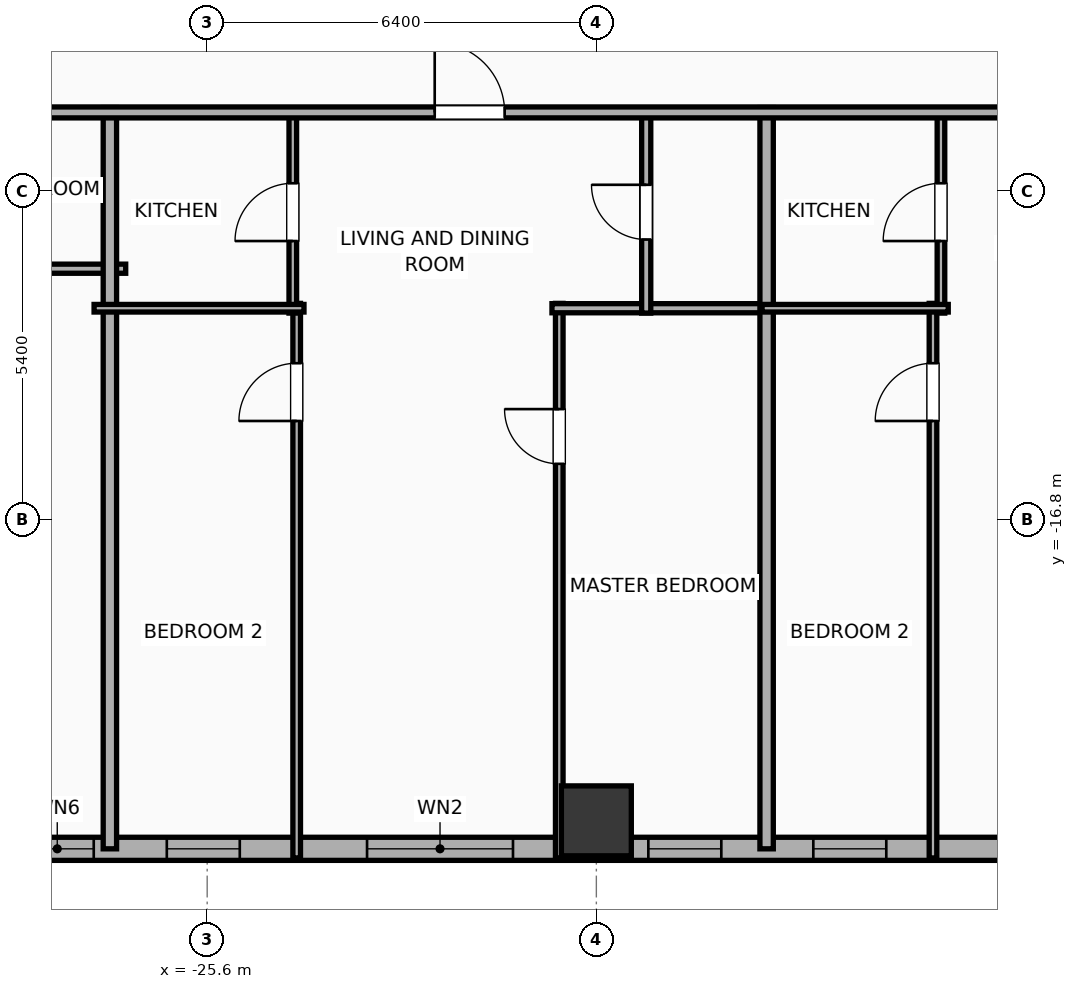
"""IFC4 building model, lengths in metres.
Left out: names, types, materials, properties, quantities, classifications, styles, units other than length and angle.
Written with IfcOpenShell. Run it as: python <this file> out.ifc"""

import sys

from ifc_helpers import new_model, si_unit, direction, frame, frame_2d, origin, origin_2d, place, context, subcontext, project, spatial, rectangle, hollow_rectangle, extrude, element, fill, save


model = new_model("IFC4")
c1 = context("Model", 3, precision=1e-05, world=origin(), true_north=direction((0.0, 1.0)))
c2 = subcontext(c1, "Body", "Model", "MODEL_VIEW")
j1 = project(units=[si_unit("LENGTHUNIT", "METRE"), si_unit("PLANEANGLEUNIT", "RADIAN")], contexts=[c1])
p1 = place(None, origin())
s1 = spatial("IfcSite", under=j1, at=p1, CompositionType="ELEMENT")
p2 = place(p1, origin())
s2 = spatial("IfcBuilding", under=s1, at=p2, CompositionType="ELEMENT")
p3 = place(p2, frame((0.0, 0.0, 45.5)))
s3 = spatial("IfcBuildingStorey", under=s2, at=p3, CompositionType="ELEMENT", Elevation=45.5)
p4 = place(p3, frame((-19.2, -21.75, 0.0), z_axis=(0.0, 0.0, 1.0), x_axis=(1.0, 0.0, 0.0)))
e1 = element("IfcColumn", 1, at=p4, inside=s3, PredefinedType="COLUMN", context=c2, shape_type="SweptSolid", body=[
    extrude(hollow_rectangle(XDim=1.15, YDim=1.15, WallThickness=0.04, at=origin_2d()), origin(), (0.0, 0.0, 1.0), 3.9),
])
p5 = place(p3, frame((22.381, -22.21, 0.0), z_axis=(0.0, 0.0, 1.0), x_axis=(-1.0, 0.0, 0.0)))
e2 = element("IfcWall", 2, at=p5, inside=s3, PredefinedType="ELEMENTEDWALL", context=c2, shape_type="SweptSolid", body=[
    extrude(rectangle(XDim=51.963, YDim=0.38, at=frame_2d((25.981, 0.0))), origin(), (0.0, 0.0, 1.0), 3.65),
])
p6 = place(p5, frame((42.952, 0.0, 0.75)))
e3 = element("IfcOpeningElement", 3, at=p6, cuts=e2, PredefinedType="OPENING", context=c2, shape_type="SweptSolid", body=[
    extrude(rectangle(XDim=2.4, YDim=2.1, at=frame_2d((1.2, 1.05))), frame((0.0, 0.2, 0.0), z_axis=(0.0, -1.0, 0.0), x_axis=(1.0, 0.0, 0.0)), (0.0, 0.0, 1.0), 0.4),
])
p7 = place(p5, frame((49.847, 0.0, 0.75)))
e4 = element("IfcOpeningElement", 4, at=p7, cuts=e2, PredefinedType="OPENING", context=c2, shape_type="SweptSolid", body=[
    extrude(rectangle(XDim=1.2, YDim=2.05, at=frame_2d((0.6, 1.025))), frame((0.0, 0.2, 0.0), z_axis=(0.0, -1.0, 0.0), x_axis=(1.0, 0.0, 0.0)), (0.0, 0.0, 1.0), 0.4),
])
p8 = place(p5, frame((47.445, 0.0, 0.75)))
e5 = element("IfcOpeningElement", 5, at=p8, cuts=e2, PredefinedType="OPENING", context=c2, shape_type="SweptSolid", body=[
    extrude(rectangle(XDim=1.2, YDim=2.05, at=frame_2d((0.6, 1.025))), frame((0.0, 0.2, 0.0), z_axis=(0.0, -1.0, 0.0), x_axis=(1.0, 0.0, 0.0)), (0.0, 0.0, 1.0), 0.4),
])
p9 = place(p5, frame((39.526, 0.0, 0.75)))
e6 = element("IfcOpeningElement", 6, at=p9, cuts=e2, PredefinedType="OPENING", context=c2, shape_type="SweptSolid", body=[
    extrude(rectangle(XDim=1.2, YDim=2.05, at=frame_2d((0.6, 1.025))), frame((0.0, 0.2, 0.0), z_axis=(0.0, -1.0, 0.0), x_axis=(1.0, 0.0, 0.0)), (0.0, 0.0, 1.0), 0.4),
])
p10 = place(p5, frame((33.018, 0.0, 0.75)))
e7 = element("IfcOpeningElement", 7, at=p10, cuts=e2, PredefinedType="OPENING", context=c2, shape_type="SweptSolid", body=[
    extrude(rectangle(XDim=1.2, YDim=2.05, at=frame_2d((0.6, 1.025))), frame((0.0, 0.2, 0.0), z_axis=(0.0, -1.0, 0.0), x_axis=(1.0, 0.0, 0.0)), (0.0, 0.0, 1.0), 0.4),
])
p11 = place(p5, frame((36.813, 0.0, 0.75)))
e8 = element("IfcOpeningElement", 8, at=p11, cuts=e2, PredefinedType="OPENING", context=c2, shape_type="SweptSolid", body=[
    extrude(rectangle(XDim=1.2, YDim=2.05, at=frame_2d((0.6, 1.025))), frame((0.0, 0.2, 0.0), z_axis=(0.0, -1.0, 0.0), x_axis=(1.0, 0.0, 0.0)), (0.0, 0.0, 1.0), 0.4),
])
p12 = place(p5, frame((28.886, 0.0, 0.75)))
e9 = element("IfcOpeningElement", 9, at=p12, cuts=e2, PredefinedType="OPENING", context=c2, shape_type="SweptSolid", body=[
    extrude(rectangle(XDim=1.2, YDim=2.05, at=frame_2d((0.6, 1.025))), frame((0.0, 0.2, 0.0), z_axis=(0.0, -1.0, 0.0), x_axis=(1.0, 0.0, 0.0)), (0.0, 0.0, 1.0), 0.4),
])
p13 = place(p5, frame((23.306, 0.0, 0.75)))
e10 = element("IfcOpeningElement", 10, at=p13, cuts=e2, PredefinedType="OPENING", context=c2, shape_type="SweptSolid", body=[
    extrude(rectangle(XDim=1.2, YDim=2.05, at=frame_2d((0.6, 1.025))), frame((0.0, 0.2, 0.0), z_axis=(0.0, -1.0, 0.0), x_axis=(1.0, 0.0, 0.0)), (0.0, 0.0, 1.0), 0.4),
])
p14 = place(p5, frame((26.056, 0.0, 0.75)))
e11 = element("IfcOpeningElement", 11, at=p14, cuts=e2, PredefinedType="OPENING", context=c2, shape_type="SweptSolid", body=[
    extrude(rectangle(XDim=1.2, YDim=2.05, at=frame_2d((0.6, 1.025))), frame((0.0, 0.2, 0.0), z_axis=(0.0, -1.0, 0.0), x_axis=(1.0, 0.0, 0.0)), (0.0, 0.0, 1.0), 0.4),
])
p15 = place(p5, frame((18.811, 0.0, 0.75)))
e12 = element("IfcOpeningElement", 12, at=p15, cuts=e2, PredefinedType="OPENING", context=c2, shape_type="SweptSolid", body=[
    extrude(rectangle(XDim=1.2, YDim=2.05, at=frame_2d((0.6, 1.025))), frame((0.0, 0.2, 0.0), z_axis=(0.0, -1.0, 0.0), x_axis=(1.0, 0.0, 0.0)), (0.0, 0.0, 1.0), 0.4),
])
p16 = place(p5, frame((14.602, 0.0, 0.75)))
e13 = element("IfcOpeningElement", 13, at=p16, cuts=e2, PredefinedType="OPENING", context=c2, shape_type="SweptSolid", body=[
    extrude(rectangle(XDim=1.2, YDim=2.05, at=frame_2d((0.6, 1.025))), frame((0.0, 0.2, 0.0), z_axis=(0.0, -1.0, 0.0), x_axis=(1.0, 0.0, 0.0)), (0.0, 0.0, 1.0), 0.4),
])
p17 = place(p5, frame((11.852, 0.0, 0.75)))
e14 = element("IfcOpeningElement", 14, at=p17, cuts=e2, PredefinedType="OPENING", context=c2, shape_type="SweptSolid", body=[
    extrude(rectangle(XDim=1.2, YDim=2.05, at=frame_2d((0.6, 1.025))), frame((0.0, 0.2, 0.0), z_axis=(0.0, -1.0, 0.0), x_axis=(1.0, 0.0, 0.0)), (0.0, 0.0, 1.0), 0.4),
])
p18 = place(p5, frame((8.316, 0.0, 0.75)))
e15 = element("IfcOpeningElement", 15, at=p18, cuts=e2, PredefinedType="OPENING", context=c2, shape_type="SweptSolid", body=[
    extrude(rectangle(XDim=1.2, YDim=2.05, at=frame_2d((0.6, 1.025))), frame((0.0, 0.2, 0.0), z_axis=(0.0, -1.0, 0.0), x_axis=(1.0, 0.0, 0.0)), (0.0, 0.0, 1.0), 0.4),
])
p19 = place(p5, frame((6.286, 0.0, 0.75)))
e16 = element("IfcOpeningElement", 16, at=p19, cuts=e2, PredefinedType="OPENING", context=c2, shape_type="SweptSolid", body=[
    extrude(rectangle(XDim=1.2, YDim=2.05, at=frame_2d((0.6, 1.025))), frame((0.0, 0.2, 0.0), z_axis=(0.0, -1.0, 0.0), x_axis=(1.0, 0.0, 0.0)), (0.0, 0.0, 1.0), 0.4),
])
p20 = place(p5, frame((3.737, 0.0, 0.75)))
e17 = element("IfcOpeningElement", 17, at=p20, cuts=e2, PredefinedType="OPENING", context=c2, shape_type="SweptSolid", body=[
    extrude(rectangle(XDim=1.2, YDim=2.05, at=frame_2d((0.6, 1.025))), frame((0.0, 0.2, 0.0), z_axis=(0.0, -1.0, 0.0), x_axis=(1.0, 0.0, 0.0)), (0.0, 0.0, 1.0), 0.4),
])
p21 = place(p5, frame((1.291, 0.0, 0.75)))
e18 = element("IfcOpeningElement", 18, at=p21, cuts=e2, PredefinedType="OPENING", context=c2, shape_type="SweptSolid", body=[
    extrude(rectangle(XDim=1.2, YDim=2.05, at=frame_2d((0.6, 1.025))), frame((0.0, 0.2, 0.0), z_axis=(0.0, -1.0, 0.0), x_axis=(1.0, 0.0, 0.0)), (0.0, 0.0, 1.0), 0.4),
])
p22 = place(p3, frame((-29.414, -12.67, 0.0), z_axis=(0.0, 0.0, 1.0), x_axis=(1.0, 0.0, 0.0)))
e19 = element("IfcWall", 19, at=p22, inside=s3, PredefinedType="PLUMBINGWALL", context=c2, shape_type="SweptSolid", body=[
    extrude(rectangle(XDim=2.474, YDim=0.15, at=frame_2d((1.237, 0.0))), origin(), (0.0, 0.0, 1.0), 3.65),
])
p23 = place(p3, frame((-27.2, -22.21, 0.0), z_axis=(0.0, 0.0, 1.0), x_axis=(0.0, 1.0, 0.0)))
e20 = element("IfcWall", 20, at=p23, inside=s3, PredefinedType="PARTITIONING", context=c2, shape_type="SweptSolid", body=[
    extrude(rectangle(XDim=12.19, YDim=0.22, at=frame_2d((6.095, 0.0))), origin(), (0.0, 0.0, 1.0), 3.65),
])
p24 = place(p3, frame((-24.128, -22.36, 0.0), z_axis=(0.0, 0.0, 1.0), x_axis=(0.0, 1.0, 0.0)))
e21 = element("IfcWall", 21, at=p24, inside=s3, PredefinedType="PARTITIONING", context=c2, shape_type="SweptSolid", body=[
    extrude(rectangle(XDim=9.12, YDim=0.125, at=frame_2d((4.56, 0.0))), origin(), (0.0, 0.0, 1.0), 3.65),
])
p25 = place(p24, frame((7.186, 0.0, 0.0)))
e22 = element("IfcOpeningElement", 22, at=p25, cuts=e21, PredefinedType="OPENING", context=c2, shape_type="SweptSolid", body=[
    extrude(rectangle(XDim=0.95, YDim=2.05, at=frame_2d((0.475, 1.025))), frame((0.0, 0.073, 0.0), z_axis=(0.0, -1.0, 0.0), x_axis=(1.0, 0.0, 0.0)), (0.0, 0.0, 1.0), 0.145),
])
p26 = place(p3, frame((-19.81, -22.36, 0.0), z_axis=(0.0, 0.0, 1.0), x_axis=(0.0, 1.0, 0.0)))
e23 = element("IfcWall", 23, at=p26, inside=s3, PredefinedType="PARTITIONING", context=c2, shape_type="SweptSolid", body=[
    extrude(rectangle(XDim=9.12, YDim=0.125, at=frame_2d((4.56, 0.0))), origin(), (0.0, 0.0, 1.0), 3.65),
])
p27 = place(p26, frame((6.481, 0.0, 0.0)))
e24 = element("IfcOpeningElement", 24, at=p27, cuts=e23, PredefinedType="OPENING", context=c2, shape_type="SweptSolid", body=[
    extrude(rectangle(XDim=0.9, YDim=2.05, at=frame_2d((0.45, 1.025))), frame((0.0, 0.073, 0.0), z_axis=(0.0, -1.0, 0.0), x_axis=(1.0, 0.0, 0.0)), (0.0, 0.0, 1.0), 0.145),
])
p28 = place(p3, frame((-19.93, -13.32, 0.0), z_axis=(0.0, 0.0, 1.0), x_axis=(1.0, 0.0, 0.0)))
e25 = element("IfcWall", 25, at=p28, inside=s3, PredefinedType="PLUMBINGWALL", context=c2, shape_type="SweptSolid", body=[
    extrude(rectangle(XDim=3.605, YDim=0.15, at=frame_2d((1.802, 0.0))), origin(), (0.0, 0.0, 1.0), 3.65),
])
p29 = place(p3, frame((-24.192, -13.4, 0.0), z_axis=(0.0, 0.0, 1.0), x_axis=(0.0, 1.0, 0.0)))
e26 = element("IfcWall", 26, at=p29, inside=s3, PredefinedType="PARTITIONING", context=c2, shape_type="SweptSolid", body=[
    extrude(rectangle(XDim=3.32, YDim=0.125, at=frame_2d((1.66, 0.0))), origin(), (0.0, 0.0, 1.0), 3.65),
])
p30 = place(p29, frame((1.185, 0.0, 0.0)))
e27 = element("IfcOpeningElement", 27, at=p30, cuts=e26, PredefinedType="OPENING", context=c2, shape_type="SweptSolid", body=[
    extrude(rectangle(XDim=0.95, YDim=2.05, at=frame_2d((0.475, 1.025))), frame((0.0, 0.073, 0.0), z_axis=(0.0, -1.0, 0.0), x_axis=(1.0, 0.0, 0.0)), (0.0, 0.0, 1.0), 0.145),
])
p31 = place(p3, frame((-27.46, -13.32, 0.0), z_axis=(0.0, 0.0, 1.0), x_axis=(1.0, 0.0, 0.0)))
e28 = element("IfcWall", 28, at=p31, inside=s3, PredefinedType="PARTITIONING", context=c2, shape_type="SweptSolid", body=[
    extrude(rectangle(XDim=3.452, YDim=0.125, at=frame_2d((1.726, 0.0))), origin(), (0.0, 0.0, 1.0), 3.65),
])
p32 = place(p3, frame((-18.38, -13.4, 0.0), z_axis=(0.0, 0.0, 1.0), x_axis=(0.0, 1.0, 0.0)))
e29 = element("IfcWall", 29, at=p32, inside=s3, PredefinedType="PLUMBINGWALL", context=c2, shape_type="SweptSolid", body=[
    extrude(rectangle(XDim=3.32, YDim=0.15, at=frame_2d((1.66, 0.0))), origin(), (0.0, 0.0, 1.0), 3.65),
])
p33 = place(p32, frame((1.21, 0.0, 0.0)))
e30 = element("IfcOpeningElement", 30, at=p33, cuts=e29, PredefinedType="OPENING", context=c2, shape_type="SweptSolid", body=[
    extrude(rectangle(XDim=0.9, YDim=2.05, at=frame_2d((0.45, 1.025))), frame((0.0, 0.085, 0.0), z_axis=(0.0, -1.0, 0.0), x_axis=(1.0, 0.0, 0.0)), (0.0, 0.0, 1.0), 0.17),
])
p34 = place(p3, frame((-16.4, -22.21, 0.0), z_axis=(0.0, 0.0, 1.0), x_axis=(0.0, 1.0, 0.0)))
e31 = element("IfcWall", 31, at=p34, inside=s3, PredefinedType="PARTITIONING", context=c2, shape_type="SweptSolid", body=[
    extrude(rectangle(XDim=12.19, YDim=0.22, at=frame_2d((6.095, 0.0))), origin(), (0.0, 0.0, 1.0), 3.65),
])
p35 = place(p3, frame((-13.664, -22.36, 0.0), z_axis=(0.0, 0.0, 1.0), x_axis=(0.0, 1.0, 0.0)))
e32 = element("IfcWall", 32, at=p35, inside=s3, PredefinedType="PARTITIONING", context=c2, shape_type="SweptSolid", body=[
    extrude(rectangle(XDim=9.12, YDim=0.125, at=frame_2d((4.56, 0.0))), origin(), (0.0, 0.0, 1.0), 3.65),
])
p36 = place(p35, frame((7.186, 0.0, 0.0)))
e33 = element("IfcOpeningElement", 33, at=p36, cuts=e32, PredefinedType="OPENING", context=c2, shape_type="SweptSolid", body=[
    extrude(rectangle(XDim=0.95, YDim=2.05, at=frame_2d((0.475, 1.025))), frame((0.0, 0.073, 0.0), z_axis=(0.0, -1.0, 0.0), x_axis=(1.0, 0.0, 0.0)), (0.0, 0.0, 1.0), 0.145),
])
p37 = place(p3, frame((-13.533, -13.4, 0.0), z_axis=(0.0, 0.0, 1.0), x_axis=(0.0, 1.0, 0.0)))
e34 = element("IfcWall", 34, at=p37, inside=s3, PredefinedType="PARTITIONING", context=c2, shape_type="SweptSolid", body=[
    extrude(rectangle(XDim=3.32, YDim=0.125, at=frame_2d((1.66, 0.0))), origin(), (0.0, 0.0, 1.0), 3.65),
])
p38 = place(p37, frame((1.185, 0.0, 0.0)))
e35 = element("IfcOpeningElement", 35, at=p38, cuts=e34, PredefinedType="OPENING", context=c2, shape_type="SweptSolid", body=[
    extrude(rectangle(XDim=0.95, YDim=2.05, at=frame_2d((0.475, 1.025))), frame((0.0, 0.073, 0.0), z_axis=(0.0, -1.0, 0.0), x_axis=(1.0, 0.0, 0.0)), (0.0, 0.0, 1.0), 0.145),
])
p39 = place(p3, frame((-16.475, -13.32, 0.0), z_axis=(0.0, 0.0, 1.0), x_axis=(1.0, 0.0, 0.0)))
e36 = element("IfcWall", 36, at=p39, inside=s3, PredefinedType="PARTITIONING", context=c2, shape_type="SweptSolid", body=[
    extrude(rectangle(XDim=3.062, YDim=0.125, at=frame_2d((1.531, 0.0))), origin(), (0.0, 0.0, 1.0), 3.65),
])
p40 = place(p3, frame((-33.41, -10.1, 0.0), z_axis=(0.0, 0.0, 1.0), x_axis=(1.0, 0.0, 0.0)))
e37 = element("IfcWall", 37, at=p40, inside=s3, PredefinedType="PARTITIONING", context=c2, shape_type="SweptSolid", body=[
    extrude(rectangle(XDim=59.62, YDim=0.18, at=frame_2d((29.81, 0.0))), origin(), (0.0, 0.0, 1.0), 3.65),
])
p41 = place(p40, frame((2.746, 0.0, 0.0)))
e38 = element("IfcOpeningElement", 38, at=p41, cuts=e37, PredefinedType="OPENING", context=c2, shape_type="SweptSolid", body=[
    extrude(rectangle(XDim=0.9, YDim=2.05, at=frame_2d((0.45, 1.025))), frame((0.0, 0.1, 0.0), z_axis=(0.0, -1.0, 0.0), x_axis=(1.0, 0.0, 0.0)), (0.0, 0.0, 1.0), 0.2),
])
p42 = place(p40, frame((11.552, 0.0, 0.0)))
e39 = element("IfcOpeningElement", 39, at=p42, cuts=e37, PredefinedType="OPENING", context=c2, shape_type="SweptSolid", body=[
    extrude(rectangle(XDim=1.15, YDim=2.05, at=frame_2d((0.575, 1.025))), frame((0.0, 0.1, 0.0), z_axis=(0.0, -1.0, 0.0), x_axis=(1.0, 0.0, 0.0)), (0.0, 0.0, 1.0), 0.2),
])
p43 = place(p40, frame((22.379, 0.0, 0.0)))
e40 = element("IfcOpeningElement", 40, at=p43, cuts=e37, PredefinedType="OPENING", context=c2, shape_type="SweptSolid", body=[
    extrude(rectangle(XDim=1.15, YDim=2.05, at=frame_2d((0.575, 1.025))), frame((0.0, 0.1, 0.0), z_axis=(0.0, -1.0, 0.0), x_axis=(1.0, 0.0, 0.0)), (0.0, 0.0, 1.0), 0.2),
])
p44 = place(p40, frame((31.28, 0.0, 0.0)))
e41 = element("IfcOpeningElement", 41, at=p44, cuts=e37, PredefinedType="OPENING", context=c2, shape_type="SweptSolid", body=[
    extrude(rectangle(XDim=1.15, YDim=2.05, at=frame_2d((0.575, 1.025))), frame((0.0, 0.1, 0.0), z_axis=(0.0, -1.0, 0.0), x_axis=(1.0, 0.0, 0.0)), (0.0, 0.0, 1.0), 0.2),
])
p45 = place(p40, frame((36.02, 0.0, 0.0)))
e42 = element("IfcOpeningElement", 42, at=p45, cuts=e37, PredefinedType="OPENING", context=c2, shape_type="SweptSolid", body=[
    extrude(rectangle(XDim=0.9, YDim=2.05, at=frame_2d((0.45, 1.025))), frame((0.0, 0.1, 0.0), z_axis=(0.0, -1.0, 0.0), x_axis=(1.0, 0.0, 0.0)), (0.0, 0.0, 1.0), 0.2),
])
p46 = place(p40, frame((40.044, 0.0, 0.0)))
e43 = element("IfcOpeningElement", 43, at=p46, cuts=e37, PredefinedType="OPENING", context=c2, shape_type="SweptSolid", body=[
    extrude(rectangle(XDim=1.15, YDim=2.05, at=frame_2d((0.575, 1.025))), frame((0.0, 0.1, 0.0), z_axis=(0.0, -1.0, 0.0), x_axis=(1.0, 0.0, 0.0)), (0.0, 0.0, 1.0), 0.2),
])
p47 = place(p40, frame((45.613, 0.0, 0.0)))
e44 = element("IfcOpeningElement", 44, at=p47, cuts=e37, PredefinedType="OPENING", context=c2, shape_type="SweptSolid", body=[
    extrude(rectangle(XDim=1.15, YDim=2.05, at=frame_2d((0.575, 1.025))), frame((0.0, 0.1, 0.0), z_axis=(0.0, -1.0, 0.0), x_axis=(1.0, 0.0, 0.0)), (0.0, 0.0, 1.0), 0.2),
])
p48 = place(p40, frame((54.174, 0.0, 0.0)))
e45 = element("IfcOpeningElement", 45, at=p48, cuts=e37, PredefinedType="OPENING", context=c2, shape_type="SweptSolid", body=[
    extrude(rectangle(XDim=1.15, YDim=2.05, at=frame_2d((0.575, 1.025))), frame((0.0, 0.1, 0.0), z_axis=(0.0, -1.0, 0.0), x_axis=(1.0, 0.0, 0.0)), (0.0, 0.0, 1.0), 0.2),
])
p49 = place(p6, origin())
e46 = element("IfcWindow", 46, at=p49, inside=s3, PartitioningType="SINGLE_PANEL", PredefinedType="WINDOW", context=c2, shape_type="SweptSolid", body=[
    extrude(rectangle(XDim=2.4, YDim=2.1, at=frame_2d((1.2, 1.05))), frame((0.0, 0.03, 0.0), z_axis=(0.0, -1.0, 0.0), x_axis=(1.0, 0.0, 0.0)), (0.0, 0.0, 1.0), 0.06),
])
fill(e3, e46)
p50 = place(p7, origin())
e47 = element("IfcWindow", 47, at=p50, inside=s3, PartitioningType="SINGLE_PANEL", PredefinedType="WINDOW", context=c2, shape_type="SweptSolid", body=[
    extrude(rectangle(XDim=1.2, YDim=2.05, at=frame_2d((0.6, 1.025))), frame((0.0, 0.03, 0.0), z_axis=(0.0, -1.0, 0.0), x_axis=(1.0, 0.0, 0.0)), (0.0, 0.0, 1.0), 0.06),
])
fill(e4, e47)
p51 = place(p8, origin())
e48 = element("IfcWindow", 48, at=p51, inside=s3, PartitioningType="SINGLE_PANEL", PredefinedType="WINDOW", context=c2, shape_type="SweptSolid", body=[
    extrude(rectangle(XDim=1.2, YDim=2.05, at=frame_2d((0.6, 1.025))), frame((0.0, 0.03, 0.0), z_axis=(0.0, -1.0, 0.0), x_axis=(1.0, 0.0, 0.0)), (0.0, 0.0, 1.0), 0.06),
])
fill(e5, e48)
p52 = place(p9, origin())
e49 = element("IfcWindow", 49, at=p52, inside=s3, PartitioningType="SINGLE_PANEL", PredefinedType="WINDOW", context=c2, shape_type="SweptSolid", body=[
    extrude(rectangle(XDim=1.2, YDim=2.05, at=frame_2d((0.6, 1.025))), frame((0.0, 0.03, 0.0), z_axis=(0.0, -1.0, 0.0), x_axis=(1.0, 0.0, 0.0)), (0.0, 0.0, 1.0), 0.06),
])
fill(e6, e49)
p53 = place(p11, origin())
e50 = element("IfcWindow", 50, at=p53, inside=s3, PartitioningType="SINGLE_PANEL", PredefinedType="WINDOW", context=c2, shape_type="SweptSolid", body=[
    extrude(rectangle(XDim=1.2, YDim=2.05, at=frame_2d((0.6, 1.025))), frame((0.0, 0.03, 0.0), z_axis=(0.0, -1.0, 0.0), x_axis=(1.0, 0.0, 0.0)), (0.0, 0.0, 1.0), 0.06),
])
fill(e8, e50)
p54 = place(p25, origin())
e51 = element("IfcDoor", 51, at=p54, inside=s3, OperationType="SINGLE_SWING_LEFT", PredefinedType="DOOR", context=c2, shape_type="SweptSolid", body=[
    extrude(rectangle(XDim=0.95, YDim=2.05, at=frame_2d((0.475, 1.025))), frame((0.0, 0.025, 0.0), z_axis=(0.0, -1.0, 0.0), x_axis=(1.0, 0.0, 0.0)), (0.0, 0.0, 1.0), 0.05),
])
fill(e22, e51)
p55 = place(p27, origin())
e52 = element("IfcDoor", 52, at=p55, inside=s3, OperationType="SINGLE_SWING_RIGHT", PredefinedType="DOOR", context=c2, shape_type="SweptSolid", body=[
    extrude(rectangle(XDim=0.9, YDim=2.05, at=frame_2d((0.45, 1.025))), frame((0.0, 0.025, 0.0), z_axis=(0.0, -1.0, 0.0), x_axis=(1.0, 0.0, 0.0)), (0.0, 0.0, 1.0), 0.05),
])
fill(e24, e52)
p56 = place(p30, origin())
e53 = element("IfcDoor", 53, at=p56, inside=s3, OperationType="SINGLE_SWING_LEFT", PredefinedType="DOOR", context=c2, shape_type="SweptSolid", body=[
    extrude(rectangle(XDim=0.95, YDim=2.05, at=frame_2d((0.475, 1.025))), frame((0.0, 0.025, 0.0), z_axis=(0.0, -1.0, 0.0), x_axis=(1.0, 0.0, 0.0)), (0.0, 0.0, 1.0), 0.05),
])
fill(e27, e53)
p57 = place(p33, origin())
e54 = element("IfcDoor", 54, at=p57, inside=s3, OperationType="SINGLE_SWING_RIGHT", PredefinedType="DOOR", context=c2, shape_type="SweptSolid", body=[
    extrude(rectangle(XDim=0.9, YDim=2.05, at=frame_2d((0.45, 1.025))), frame((0.0, 0.025, 0.0), z_axis=(0.0, -1.0, 0.0), x_axis=(1.0, 0.0, 0.0)), (0.0, 0.0, 1.0), 0.05),
])
fill(e30, e54)
p58 = place(p36, origin())
e55 = element("IfcDoor", 55, at=p58, inside=s3, OperationType="SINGLE_SWING_LEFT", PredefinedType="DOOR", context=c2, shape_type="SweptSolid", body=[
    extrude(rectangle(XDim=0.95, YDim=2.05, at=frame_2d((0.475, 1.025))), frame((0.0, 0.025, 0.0), z_axis=(0.0, -1.0, 0.0), x_axis=(1.0, 0.0, 0.0)), (0.0, 0.0, 1.0), 0.05),
])
fill(e33, e55)
p59 = place(p38, origin())
e56 = element("IfcDoor", 56, at=p59, inside=s3, OperationType="SINGLE_SWING_LEFT", PredefinedType="DOOR", context=c2, shape_type="SweptSolid", body=[
    extrude(rectangle(XDim=0.95, YDim=2.05, at=frame_2d((0.475, 1.025))), frame((0.0, 0.025, 0.0), z_axis=(0.0, -1.0, 0.0), x_axis=(1.0, 0.0, 0.0)), (0.0, 0.0, 1.0), 0.05),
])
fill(e35, e56)
p60 = place(p42, origin())
e57 = element("IfcDoor", 57, at=p60, inside=s3, OperationType="SINGLE_SWING_LEFT", PredefinedType="DOOR", context=c2, shape_type="SweptSolid", body=[
    extrude(rectangle(XDim=1.15, YDim=2.05, at=frame_2d((0.575, 1.025))), frame((0.0, 0.025, 0.0), z_axis=(0.0, -1.0, 0.0), x_axis=(1.0, 0.0, 0.0)), (0.0, 0.0, 1.0), 0.05),
])
fill(e39, e57)
save(model, sys.argv[1])
